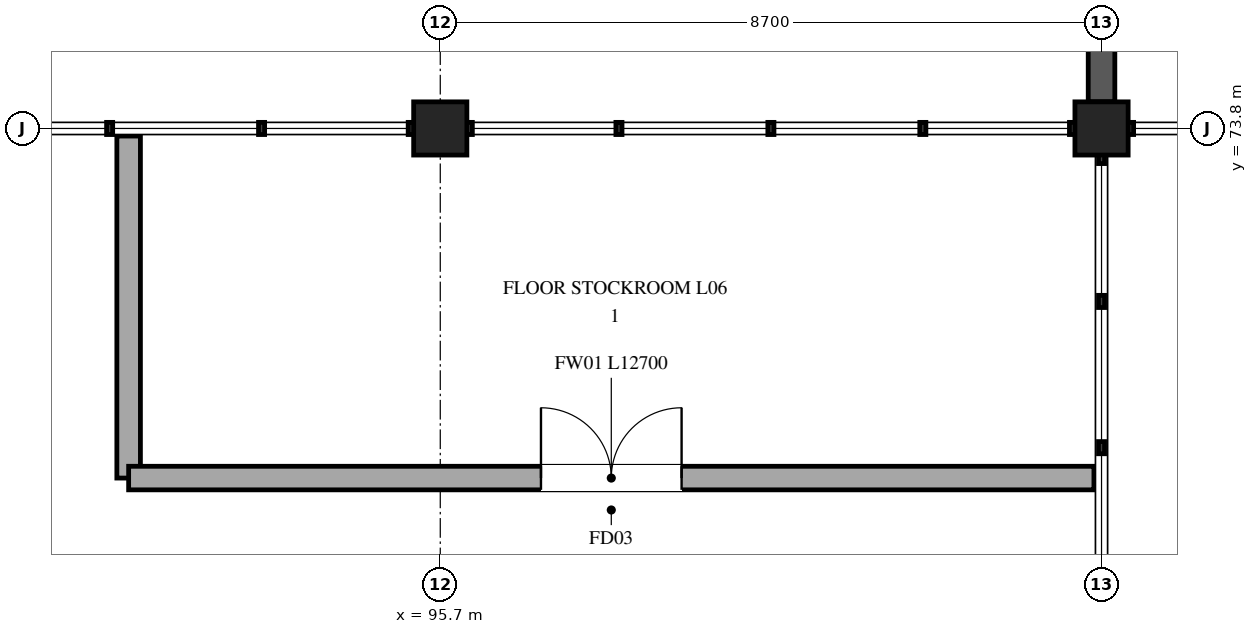
"""IFC4 building model, lengths in metres.
Left out: names, types, materials, properties, quantities, classifications, styles, units other than length and angle.
Written with IfcOpenShell. Run it as: python <this file> out.ifc"""

import sys

from ifc_helpers import new_model, si_unit, direction, frame, frame_2d, origin, origin_2d, place, context, subcontext, project, spatial, rectangle, extrude, element, fill, save


model = new_model("IFC4")
c1 = context("Model", 3, precision=1e-05, world=origin(), true_north=direction((0.0, 1.0)))
c2 = subcontext(c1, "Body", "Model", "MODEL_VIEW")
j1 = project(units=[si_unit("LENGTHUNIT", "METRE"), si_unit("PLANEANGLEUNIT", "RADIAN")], contexts=[c1])
p1 = place(None, origin())
s1 = spatial("IfcSite", under=j1, at=p1, CompositionType="ELEMENT")
p2 = place(p1, origin())
s2 = spatial("IfcBuilding", under=s1, at=p2, CompositionType="ELEMENT")
p3 = place(p2, frame((0.0, 0.0, 26.7)))
s3 = spatial("IfcBuildingStorey", under=s2, at=p3, CompositionType="ELEMENT", Elevation=26.7)
for number, where, z_axis, x_axis in (
    (1, (95.7, 73.8, 0.0), (0.0, 0.0, 1.0), (1.0, 0.0, 0.0)),
    (2, (104.4, 73.8, 0.0), (0.0, 0.0, 1.0), (1.0, 0.0, 0.0)),
):
    element("IfcColumn", number, at=place(p3, frame(where, z_axis=z_axis, x_axis=x_axis)), inside=s3, PredefinedType="COLUMN", context=c2, shape_type="SweptSolid", body=[
        extrude(rectangle(XDim=0.7, YDim=0.7, at=origin_2d()), origin(), (0.0, 0.0, 1.0), 4.8),
    ])
p4 = place(p3, frame((104.4, 74.152, 0.0), z_axis=(0.0, 0.0, 1.0), x_axis=(0.0, 1.0, 0.0)))
e3 = element("IfcWall", 3, at=p4, inside=s3, PredefinedType="STANDARD", context=c2, shape_type="SweptSolid", body=[
    extrude(rectangle(XDim=7.696, YDim=0.35, at=frame_2d((3.848, 0.0))), origin(), (0.0, 0.0, 1.0), 4.49),
])
p5 = place(p4, frame((1.348, 0.0, 0.85)))
e4 = element("IfcOpeningElement", 4, at=p5, cuts=e3, PredefinedType="OPENING", context=c2, shape_type="SweptSolid", body=[
    extrude(rectangle(XDim=5.0, YDim=2.65, at=frame_2d((2.5, 1.325))), frame((0.0, 0.185, 0.0), z_axis=(0.0, -1.0, 0.0), x_axis=(1.0, 0.0, 0.0)), (0.0, 0.0, 1.0), 0.37),
])
p6 = place(p3, frame((91.6, 73.7, 0.0), z_axis=(0.0, 0.0, 1.0), x_axis=(0.0, -1.0, 0.0)))
e5 = element("IfcWall", 5, at=p6, inside=s3, PredefinedType="STANDARD", context=c2, shape_type="SweptSolid", body=[
    extrude(rectangle(XDim=4.5, YDim=0.31, at=frame_2d((2.25, 0.0))), origin(), (0.0, 0.0, 1.0), 3.96),
])
p7 = place(p3, frame((91.6, 69.2, 0.0), z_axis=(0.0, 0.0, 1.0), x_axis=(1.0, 0.0, 0.0)))
e6 = element("IfcWall", 6, at=p7, inside=s3, PredefinedType="STANDARD", context=c2, shape_type="SweptSolid", body=[
    extrude(rectangle(XDim=12.7, YDim=0.31, at=frame_2d((6.35, 0.0))), origin(), (0.0, 0.0, 1.0), 3.76),
])
p8 = place(p7, frame((5.425, 0.0, 0.0)))
e7 = element("IfcOpeningElement", 7, at=p8, cuts=e6, PredefinedType="OPENING", context=c2, shape_type="SweptSolid", body=[
    extrude(rectangle(XDim=1.85, YDim=2.3, at=frame_2d((0.925, 1.15))), frame((0.0, 0.165, 0.0), z_axis=(0.0, -1.0, 0.0), x_axis=(1.0, 0.0, 0.0)), (0.0, 0.0, 1.0), 0.33),
])
p9 = place(p8, origin())
e8 = element("IfcDoor", 8, at=p9, inside=s3, OperationType="DOUBLE_DOOR_SINGLE_SWING", PredefinedType="DOOR", context=c2, shape_type="SweptSolid", body=[
    extrude(rectangle(XDim=1.85, YDim=2.3, at=frame_2d((0.925, 1.15))), frame((0.0, 0.025, 0.0), z_axis=(0.0, -1.0, 0.0), x_axis=(1.0, 0.0, 0.0)), (0.0, 0.0, 1.0), 0.05),
])
fill(e7, e8)
save(model, sys.argv[1])
